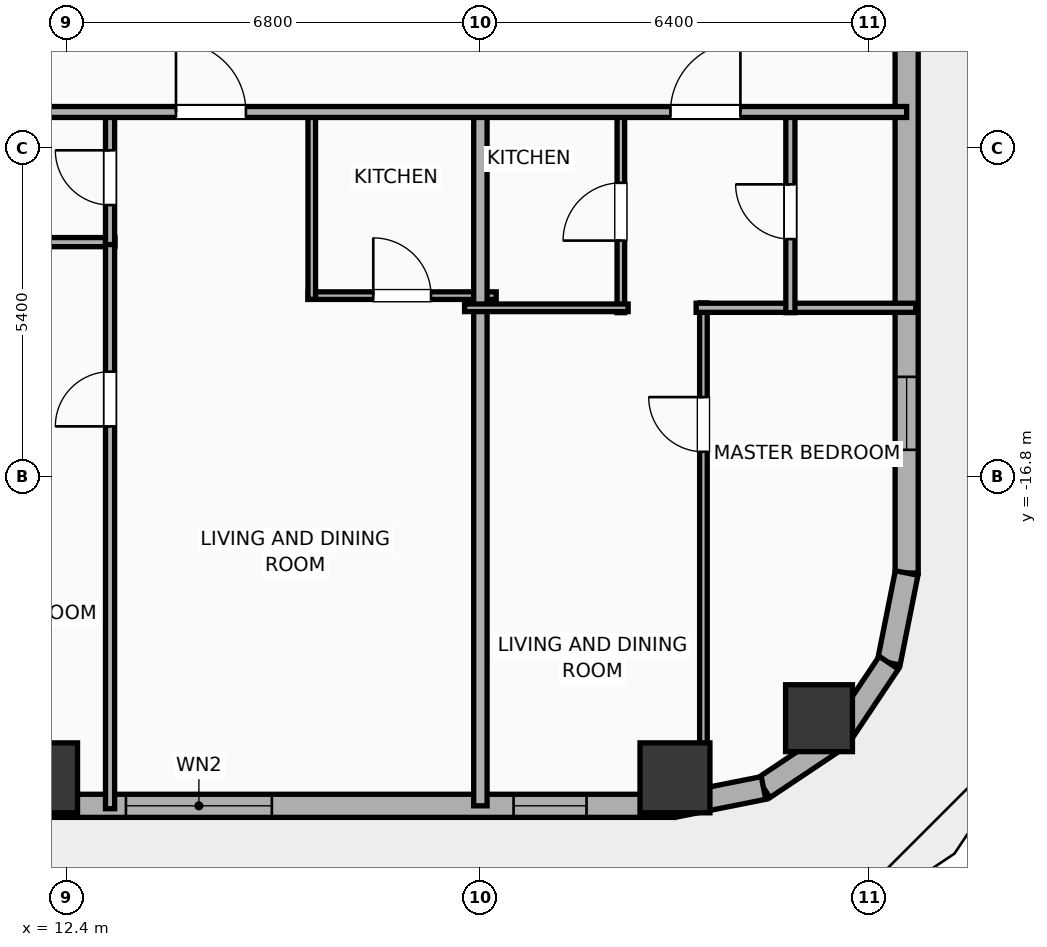
"""IFC4 building model, lengths in metres.
Left out: names, types, materials, properties, quantities, classifications, styles, units other than length and angle.
Written with IfcOpenShell. Run it as: python <this file> out.ifc"""

import sys

from ifc_helpers import new_model, si_unit, direction, frame, frame_2d, origin, origin_2d, place, context, subcontext, project, spatial, rectangle, hollow_rectangle, hollow_circle, extrude, element, fill, save


model = new_model("IFC4")
c1 = context("Model", 3, precision=1e-05, world=origin(), true_north=direction((0.0, 1.0)))
c2 = subcontext(c1, "Body", "Model", "MODEL_VIEW")
j1 = project(units=[si_unit("LENGTHUNIT", "METRE"), si_unit("PLANEANGLEUNIT", "RADIAN")], contexts=[c1])
p1 = place(None, origin())
s1 = spatial("IfcSite", under=j1, at=p1, CompositionType="ELEMENT")
p2 = place(p1, origin())
s2 = spatial("IfcBuilding", under=s1, at=p2, CompositionType="ELEMENT")
p3 = place(p2, frame((0.0, 0.0, 53.3)))
s3 = spatial("IfcBuildingStorey", under=s2, at=p3, CompositionType="ELEMENT", Elevation=53.3)
for number, where, z_axis, x_axis in (
    (1, (12.0, -21.75, 0.0), (0.0, 0.0, 1.0), (1.0, 0.0, 0.0)),
    (2, (22.4, -21.75, 0.0), (0.0, 0.0, 1.0), (1.0, 0.0, 0.0)),
):
    element("IfcColumn", number, at=place(p3, frame(where, z_axis=z_axis, x_axis=x_axis)), inside=s3, PredefinedType="COLUMN", context=c2, shape_type="SweptSolid", body=[
        extrude(hollow_rectangle(XDim=1.15, YDim=1.15, WallThickness=0.04, at=origin_2d()), origin(), (0.0, 0.0, 1.0), 3.9),
    ])
p4 = place(p3, frame((24.769, -20.769, 0.0), z_axis=(0.0, 0.0, 1.0), x_axis=(1.0, 0.0, 0.0)))
e3 = element("IfcColumn", 3, at=p4, inside=s3, PredefinedType="COLUMN", context=c2, shape_type="SweptSolid", body=[
    extrude(hollow_circle(Radius=0.55, WallThickness=0.036, at=origin_2d()), origin(), (0.0, 0.0, 1.0), 3.9),
])
p5 = place(p3, frame((22.381, -22.21, 0.0), z_axis=(0.0, 0.0, 1.0), x_axis=(-1.0, 0.0, 0.0)))
e4 = element("IfcWall", 4, at=p5, inside=s3, PredefinedType="ELEMENTEDWALL", context=c2, shape_type="SweptSolid", body=[
    extrude(rectangle(XDim=51.963, YDim=0.38, at=frame_2d((25.981, 0.0))), origin(), (0.0, 0.0, 1.0), 3.65),
])
p6 = place(p5, frame((14.839, 0.0, 0.0)))
e5 = element("IfcOpeningElement", 5, at=p6, cuts=e4, PredefinedType="OPENING", context=c2, shape_type="SweptSolid", body=[
    extrude(rectangle(XDim=1.5, YDim=2.05, at=frame_2d((0.75, 1.025))), frame((0.0, 0.2, 0.0), z_axis=(0.0, -1.0, 0.0), x_axis=(1.0, 0.0, 0.0)), (0.0, 0.0, 1.0), 0.4),
])
p7 = place(p5, frame((6.61, 0.0, 0.75)))
e6 = element("IfcOpeningElement", 6, at=p7, cuts=e4, PredefinedType="OPENING", context=c2, shape_type="SweptSolid", body=[
    extrude(rectangle(XDim=2.4, YDim=2.1, at=frame_2d((1.2, 1.05))), frame((0.0, 0.2, 0.0), z_axis=(0.0, -1.0, 0.0), x_axis=(1.0, 0.0, 0.0)), (0.0, 0.0, 1.0), 0.4),
])
p8 = place(p5, frame((24.781, 0.0, 0.75)))
e7 = element("IfcOpeningElement", 7, at=p8, cuts=e4, PredefinedType="OPENING", context=c2, shape_type="SweptSolid", body=[
    extrude(rectangle(XDim=2.4, YDim=2.1, at=frame_2d((1.2, 1.05))), frame((0.0, 0.2, 0.0), z_axis=(0.0, -1.0, 0.0), x_axis=(1.0, 0.0, 0.0)), (0.0, 0.0, 1.0), 0.4),
])
p9 = place(p5, frame((49.281, 0.0, 0.75)))
e8 = element("IfcOpeningElement", 8, at=p9, cuts=e4, PredefinedType="OPENING", context=c2, shape_type="SweptSolid", body=[
    extrude(rectangle(XDim=1.2, YDim=2.05, at=frame_2d((0.6, 1.025))), frame((0.0, 0.2, 0.0), z_axis=(0.0, -1.0, 0.0), x_axis=(1.0, 0.0, 0.0)), (0.0, 0.0, 1.0), 0.4),
])
p10 = place(p5, frame((46.241, 0.0, 0.75)))
e9 = element("IfcOpeningElement", 9, at=p10, cuts=e4, PredefinedType="OPENING", context=c2, shape_type="SweptSolid", body=[
    extrude(rectangle(XDim=1.2, YDim=2.05, at=frame_2d((0.6, 1.025))), frame((0.0, 0.2, 0.0), z_axis=(0.0, -1.0, 0.0), x_axis=(1.0, 0.0, 0.0)), (0.0, 0.0, 1.0), 0.4),
])
p11 = place(p5, frame((42.686, 0.0, 0.75)))
e10 = element("IfcOpeningElement", 10, at=p11, cuts=e4, PredefinedType="OPENING", context=c2, shape_type="SweptSolid", body=[
    extrude(rectangle(XDim=1.2, YDim=2.05, at=frame_2d((0.6, 1.025))), frame((0.0, 0.2, 0.0), z_axis=(0.0, -1.0, 0.0), x_axis=(1.0, 0.0, 0.0)), (0.0, 0.0, 1.0), 0.4),
])
p12 = place(p5, frame((39.548, 0.0, 0.75)))
e11 = element("IfcOpeningElement", 11, at=p12, cuts=e4, PredefinedType="OPENING", context=c2, shape_type="SweptSolid", body=[
    extrude(rectangle(XDim=1.2, YDim=2.05, at=frame_2d((0.6, 1.025))), frame((0.0, 0.2, 0.0), z_axis=(0.0, -1.0, 0.0), x_axis=(1.0, 0.0, 0.0)), (0.0, 0.0, 1.0), 0.4),
])
p13 = place(p5, frame((34.748, 0.0, 0.75)))
e12 = element("IfcOpeningElement", 12, at=p13, cuts=e4, PredefinedType="OPENING", context=c2, shape_type="SweptSolid", body=[
    extrude(rectangle(XDim=1.2, YDim=2.05, at=frame_2d((0.6, 1.025))), frame((0.0, 0.2, 0.0), z_axis=(0.0, -1.0, 0.0), x_axis=(1.0, 0.0, 0.0)), (0.0, 0.0, 1.0), 0.4),
])
p14 = place(p5, frame((29.226, 0.0, 0.75)))
e13 = element("IfcOpeningElement", 13, at=p14, cuts=e4, PredefinedType="OPENING", context=c2, shape_type="SweptSolid", body=[
    extrude(rectangle(XDim=1.2, YDim=2.05, at=frame_2d((0.6, 1.025))), frame((0.0, 0.2, 0.0), z_axis=(0.0, -1.0, 0.0), x_axis=(1.0, 0.0, 0.0)), (0.0, 0.0, 1.0), 0.4),
])
p15 = place(p5, frame((21.568, 0.0, 0.75)))
e14 = element("IfcOpeningElement", 14, at=p15, cuts=e4, PredefinedType="OPENING", context=c2, shape_type="SweptSolid", body=[
    extrude(rectangle(XDim=0.52, YDim=2.05, at=frame_2d((0.26, 1.025))), frame((0.0, 0.2, 0.0), z_axis=(0.0, -1.0, 0.0), x_axis=(1.0, 0.0, 0.0)), (0.0, 0.0, 1.0), 0.4),
])
p16 = place(p5, frame((11.146, 0.0, 0.75)))
e15 = element("IfcOpeningElement", 15, at=p16, cuts=e4, PredefinedType="OPENING", context=c2, shape_type="SweptSolid", body=[
    extrude(rectangle(XDim=1.2, YDim=2.05, at=frame_2d((0.6, 1.025))), frame((0.0, 0.2, 0.0), z_axis=(0.0, -1.0, 0.0), x_axis=(1.0, 0.0, 0.0)), (0.0, 0.0, 1.0), 0.4),
])
p17 = place(p5, frame((1.436, 0.0, 0.75)))
e16 = element("IfcOpeningElement", 16, at=p17, cuts=e4, PredefinedType="OPENING", context=c2, shape_type="SweptSolid", body=[
    extrude(rectangle(XDim=1.2, YDim=2.05, at=frame_2d((0.6, 1.025))), frame((0.0, 0.2, 0.0), z_axis=(0.0, -1.0, 0.0), x_axis=(1.0, 0.0, 0.0)), (0.0, 0.0, 1.0), 0.4),
])
p18 = place(p3, frame((26.21, 18.381, 0.0), z_axis=(0.0, 0.0, 1.0), x_axis=(0.0, -1.0, 0.0)))
e17 = element("IfcWall", 17, at=p18, inside=s3, PredefinedType="ELEMENTEDWALL", context=c2, shape_type="SweptSolid", body=[
    extrude(rectangle(XDim=36.763, YDim=0.38, at=frame_2d((18.381, 0.0))), origin(), (0.0, 0.0, 1.0), 3.65),
])
p19 = place(p18, frame((33.537, 0.0, 0.75)))
e18 = element("IfcOpeningElement", 18, at=p19, cuts=e17, PredefinedType="OPENING", context=c2, shape_type="SweptSolid", body=[
    extrude(rectangle(XDim=1.2, YDim=2.05, at=frame_2d((0.6, 1.025))), frame((0.0, 0.2, 0.0), z_axis=(0.0, -1.0, 0.0), x_axis=(1.0, 0.0, 0.0)), (0.0, 0.0, 1.0), 0.4),
])
p20 = place(p3, frame((26.21, -18.381, 0.0), z_axis=(0.0, 0.0, 1.0), x_axis=(-0.195086038585, -0.980786132421, 0.0)))
e19 = element("IfcWall", 19, at=p20, inside=s3, PredefinedType="ELEMENTEDWALL", context=c2, shape_type="SweptSolid", body=[
    extrude(rectangle(XDim=1.504, YDim=0.38, at=frame_2d((0.752, 0.0))), origin(), (0.0, 0.0, 1.0), 3.65),
])
for number, where, z_axis, x_axis in (
    (20, (25.917, -19.857, 0.0), (0.0, 0.0, 1.0), (-0.556, -0.831, 0.0)),
    (21, (25.091, -21.091, 0.0), (0.0, 0.0, 1.0), (-0.831, -0.556, 0.0)),
):
    element("IfcWall", number, at=place(p3, frame(where, z_axis=z_axis, x_axis=x_axis)), inside=s3, PredefinedType="ELEMENTEDWALL", context=c2, shape_type="SweptSolid", body=[
        extrude(rectangle(XDim=1.485, YDim=0.38, at=frame_2d((0.743, 0.0))), origin(), (0.0, 0.0, 1.0), 3.65),
    ])
p21 = place(p3, frame((23.857, -21.917, 0.0), z_axis=(0.0, 0.0, 1.0), x_axis=(-0.980786132421, -0.195086038585, 0.0)))
e22 = element("IfcWall", 22, at=p21, inside=s3, PredefinedType="ELEMENTEDWALL", context=c2, shape_type="SweptSolid", body=[
    extrude(rectangle(XDim=1.504, YDim=0.38, at=frame_2d((0.752, 0.0))), origin(), (0.0, 0.0, 1.0), 3.65),
])
p22 = place(p3, frame((9.34, -12.94, 0.0), z_axis=(0.0, 0.0, 1.0), x_axis=(1.0, 0.0, 0.0)))
e23 = element("IfcWall", 23, at=p22, inside=s3, PredefinedType="PLUMBINGWALL", context=c2, shape_type="SweptSolid", body=[
    extrude(rectangle(XDim=3.85, YDim=0.15, at=frame_2d((1.925, 0.0))), origin(), (0.0, 0.0, 1.0), 3.65),
])
p23 = place(p3, frame((13.11, -22.258, 0.0), z_axis=(0.0, 0.0, 1.0), x_axis=(0.0, 1.0, 0.0)))
e24 = element("IfcWall", 24, at=p23, inside=s3, PredefinedType="PLUMBINGWALL", context=c2, shape_type="SweptSolid", body=[
    extrude(rectangle(XDim=9.358, YDim=0.15, at=frame_2d((4.679, 0.0))), origin(), (0.0, 0.0, 1.0), 3.65),
])
p24 = place(p23, frame((6.288, 0.0, 0.0)))
e25 = element("IfcOpeningElement", 25, at=p24, cuts=e24, PredefinedType="OPENING", context=c2, shape_type="SweptSolid", body=[
    extrude(rectangle(XDim=0.9, YDim=2.05, at=frame_2d((0.45, 1.025))), frame((0.0, 0.085, 0.0), z_axis=(0.0, -1.0, 0.0), x_axis=(1.0, 0.0, 0.0)), (0.0, 0.0, 1.0), 0.17),
])
p25 = place(p3, frame((13.11, -12.98, 0.0), z_axis=(0.0, 0.0, 1.0), x_axis=(0.0, 1.0, 0.0)))
e26 = element("IfcWall", 26, at=p25, inside=s3, PredefinedType="PLUMBINGWALL", context=c2, shape_type="SweptSolid", body=[
    extrude(rectangle(XDim=2.2, YDim=0.15, at=frame_2d((1.1, 0.0))), origin(), (0.0, 0.0, 1.0), 3.65),
])
p26 = place(p25, frame((0.65, 0.0, 0.0)))
e27 = element("IfcOpeningElement", 27, at=p26, cuts=e26, PredefinedType="OPENING", context=c2, shape_type="SweptSolid", body=[
    extrude(rectangle(XDim=0.9, YDim=2.05, at=frame_2d((0.45, 1.025))), frame((0.0, 0.085, 0.0), z_axis=(0.0, -1.0, 0.0), x_axis=(1.0, 0.0, 0.0)), (0.0, 0.0, 1.0), 0.17),
])
p27 = place(p3, frame((16.367, -13.82, 0.0), z_axis=(0.0, 0.0, 1.0), x_axis=(1.0, 0.0, 0.0)))
e28 = element("IfcWall", 28, at=p27, inside=s3, PredefinedType="PARTITIONING", context=c2, shape_type="SweptSolid", body=[
    extrude(rectangle(XDim=3.093, YDim=0.125, at=frame_2d((1.546, 0.0))), origin(), (0.0, 0.0, 1.0), 3.65),
])
p28 = place(p27, frame((1.072, 0.0, 0.0)))
e29 = element("IfcOpeningElement", 29, at=p28, cuts=e28, PredefinedType="OPENING", context=c2, shape_type="SweptSolid", body=[
    extrude(rectangle(XDim=0.95, YDim=2.05, at=frame_2d((0.475, 1.025))), frame((0.0, 0.073, 0.0), z_axis=(0.0, -1.0, 0.0), x_axis=(1.0, 0.0, 0.0)), (0.0, 0.0, 1.0), 0.145),
])
p29 = place(p3, frame((16.427, -13.88, 0.0), z_axis=(0.0, 0.0, 1.0), x_axis=(0.0, 1.0, 0.0)))
e30 = element("IfcWall", 30, at=p29, inside=s3, PredefinedType="PARTITIONING", context=c2, shape_type="SweptSolid", body=[
    extrude(rectangle(XDim=3.1, YDim=0.125, at=frame_2d((1.55, 0.0))), origin(), (0.0, 0.0, 1.0), 3.65),
])
p30 = place(p3, frame((19.2, -22.21, 0.0), z_axis=(0.0, 0.0, 1.0), x_axis=(0.0, 1.0, 0.0)))
e31 = element("IfcWall", 31, at=p30, inside=s3, PredefinedType="PARTITIONING", context=c2, shape_type="SweptSolid", body=[
    extrude(rectangle(XDim=11.49, YDim=0.22, at=frame_2d((5.745, 0.0))), origin(), (0.0, 0.0, 1.0), 3.65),
])
p31 = place(p3, frame((22.868, -22.266, 0.0), z_axis=(0.0, 0.0, 1.0), x_axis=(0.0, 1.0, 0.0)))
e32 = element("IfcWall", 32, at=p31, inside=s3, PredefinedType="PARTITIONING", context=c2, shape_type="SweptSolid", body=[
    extrude(rectangle(XDim=8.326, YDim=0.125, at=frame_2d((4.163, 0.0))), origin(), (0.0, 0.0, 1.0), 3.65),
])
p32 = place(p31, frame((5.878, 0.0, 0.0)))
e33 = element("IfcOpeningElement", 33, at=p32, cuts=e32, PredefinedType="OPENING", context=c2, shape_type="SweptSolid", body=[
    extrude(rectangle(XDim=0.9, YDim=2.05, at=frame_2d((0.45, 1.025))), frame((0.0, 0.073, 0.0), z_axis=(0.0, -1.0, 0.0), x_axis=(1.0, 0.0, 0.0)), (0.0, 0.0, 1.0), 0.145),
])
p33 = place(p3, frame((22.748, -14.02, 0.0), z_axis=(0.0, 0.0, 1.0), x_axis=(1.0, 0.0, 0.0)))
e34 = element("IfcWall", 34, at=p33, inside=s3, PredefinedType="PLUMBINGWALL", context=c2, shape_type="SweptSolid", body=[
    extrude(rectangle(XDim=3.612, YDim=0.15, at=frame_2d((1.806, 0.0))), origin(), (0.0, 0.0, 1.0), 3.65),
])
p34 = place(p3, frame((21.51, -14.1, 0.0), z_axis=(0.0, 0.0, 1.0), x_axis=(0.0, 1.0, 0.0)))
e35 = element("IfcWall", 35, at=p34, inside=s3, PredefinedType="PARTITIONING", context=c2, shape_type="SweptSolid", body=[
    extrude(rectangle(XDim=3.32, YDim=0.125, at=frame_2d((1.66, 0.0))), origin(), (0.0, 0.0, 1.0), 3.65),
])
p35 = place(p34, frame((1.185, 0.0, 0.0)))
e36 = element("IfcOpeningElement", 36, at=p35, cuts=e35, PredefinedType="OPENING", context=c2, shape_type="SweptSolid", body=[
    extrude(rectangle(XDim=0.95, YDim=2.05, at=frame_2d((0.475, 1.025))), frame((0.0, 0.073, 0.0), z_axis=(0.0, -1.0, 0.0), x_axis=(1.0, 0.0, 0.0)), (0.0, 0.0, 1.0), 0.145),
])
p36 = place(p3, frame((18.94, -14.02, 0.0), z_axis=(0.0, 0.0, 1.0), x_axis=(1.0, 0.0, 0.0)))
e37 = element("IfcWall", 37, at=p36, inside=s3, PredefinedType="PARTITIONING", context=c2, shape_type="SweptSolid", body=[
    extrude(rectangle(XDim=2.69, YDim=0.125, at=frame_2d((1.345, 0.0))), origin(), (0.0, 0.0, 1.0), 3.65),
])
p37 = place(p3, frame((24.298, -14.1, 0.0), z_axis=(0.0, 0.0, 1.0), x_axis=(0.0, 1.0, 0.0)))
e38 = element("IfcWall", 38, at=p37, inside=s3, PredefinedType="PLUMBINGWALL", context=c2, shape_type="SweptSolid", body=[
    extrude(rectangle(XDim=3.32, YDim=0.15, at=frame_2d((1.66, 0.0))), origin(), (0.0, 0.0, 1.0), 3.65),
])
p38 = place(p37, frame((1.21, 0.0, 0.0)))
e39 = element("IfcOpeningElement", 39, at=p38, cuts=e38, PredefinedType="OPENING", context=c2, shape_type="SweptSolid", body=[
    extrude(rectangle(XDim=0.9, YDim=2.05, at=frame_2d((0.45, 1.025))), frame((0.0, 0.085, 0.0), z_axis=(0.0, -1.0, 0.0), x_axis=(1.0, 0.0, 0.0)), (0.0, 0.0, 1.0), 0.17),
])
p39 = place(p3, frame((-33.41, -10.8, 0.0), z_axis=(0.0, 0.0, 1.0), x_axis=(1.0, 0.0, 0.0)))
e40 = element("IfcWall", 40, at=p39, inside=s3, PredefinedType="PARTITIONING", context=c2, shape_type="SweptSolid", body=[
    extrude(rectangle(XDim=59.62, YDim=0.18, at=frame_2d((29.81, 0.0))), origin(), (0.0, 0.0, 1.0), 3.65),
])
p40 = place(p39, frame((3.104, 0.0, 0.0)))
e41 = element("IfcOpeningElement", 41, at=p40, cuts=e40, PredefinedType="OPENING", context=c2, shape_type="SweptSolid", body=[
    extrude(rectangle(XDim=1.15, YDim=2.05, at=frame_2d((0.575, 1.025))), frame((0.0, 0.1, 0.0), z_axis=(0.0, -1.0, 0.0), x_axis=(1.0, 0.0, 0.0)), (0.0, 0.0, 1.0), 0.2),
])
p41 = place(p39, frame((10.246, 0.0, 0.0)))
e42 = element("IfcOpeningElement", 42, at=p41, cuts=e40, PredefinedType="OPENING", context=c2, shape_type="SweptSolid", body=[
    extrude(rectangle(XDim=1.15, YDim=2.05, at=frame_2d((0.575, 1.025))), frame((0.0, 0.1, 0.0), z_axis=(0.0, -1.0, 0.0), x_axis=(1.0, 0.0, 0.0)), (0.0, 0.0, 1.0), 0.2),
])
p42 = place(p39, frame((18.336, 0.0, 0.0)))
e43 = element("IfcOpeningElement", 43, at=p42, cuts=e40, PredefinedType="OPENING", context=c2, shape_type="SweptSolid", body=[
    extrude(rectangle(XDim=1.15, YDim=2.05, at=frame_2d((0.575, 1.025))), frame((0.0, 0.1, 0.0), z_axis=(0.0, -1.0, 0.0), x_axis=(1.0, 0.0, 0.0)), (0.0, 0.0, 1.0), 0.2),
])
p43 = place(p39, frame((28.287, 0.0, 0.0)))
e44 = element("IfcOpeningElement", 44, at=p43, cuts=e40, PredefinedType="OPENING", context=c2, shape_type="SweptSolid", body=[
    extrude(rectangle(XDim=1.15, YDim=2.05, at=frame_2d((0.575, 1.025))), frame((0.0, 0.1, 0.0), z_axis=(0.0, -1.0, 0.0), x_axis=(1.0, 0.0, 0.0)), (0.0, 0.0, 1.0), 0.2),
])
p44 = place(p39, frame((37.653, 0.0, 0.0)))
e45 = element("IfcOpeningElement", 45, at=p44, cuts=e40, PredefinedType="OPENING", context=c2, shape_type="SweptSolid", body=[
    extrude(rectangle(XDim=1.15, YDim=2.05, at=frame_2d((0.575, 1.025))), frame((0.0, 0.1, 0.0), z_axis=(0.0, -1.0, 0.0), x_axis=(1.0, 0.0, 0.0)), (0.0, 0.0, 1.0), 0.2),
])
p45 = place(p39, frame((47.604, 0.0, 0.0)))
e46 = element("IfcOpeningElement", 46, at=p45, cuts=e40, PredefinedType="OPENING", context=c2, shape_type="SweptSolid", body=[
    extrude(rectangle(XDim=1.15, YDim=2.05, at=frame_2d((0.575, 1.025))), frame((0.0, 0.1, 0.0), z_axis=(0.0, -1.0, 0.0), x_axis=(1.0, 0.0, 0.0)), (0.0, 0.0, 1.0), 0.2),
])
p46 = place(p39, frame((55.736, 0.0, 0.0)))
e47 = element("IfcOpeningElement", 47, at=p46, cuts=e40, PredefinedType="OPENING", context=c2, shape_type="SweptSolid", body=[
    extrude(rectangle(XDim=1.15, YDim=2.05, at=frame_2d((0.575, 1.025))), frame((0.0, 0.1, 0.0), z_axis=(0.0, -1.0, 0.0), x_axis=(1.0, 0.0, 0.0)), (0.0, 0.0, 1.0), 0.2),
])
p47 = place(p7, origin())
e48 = element("IfcWindow", 48, at=p47, inside=s3, PartitioningType="SINGLE_PANEL", PredefinedType="WINDOW", context=c2, shape_type="SweptSolid", body=[
    extrude(rectangle(XDim=2.4, YDim=2.1, at=frame_2d((1.2, 1.05))), frame((0.0, 0.03, 0.0), z_axis=(0.0, -1.0, 0.0), x_axis=(1.0, 0.0, 0.0)), (0.0, 0.0, 1.0), 0.06),
])
fill(e6, e48)
p48 = place(p17, origin())
e49 = element("IfcWindow", 49, at=p48, inside=s3, PartitioningType="SINGLE_PANEL", PredefinedType="WINDOW", context=c2, shape_type="SweptSolid", body=[
    extrude(rectangle(XDim=1.2, YDim=2.05, at=frame_2d((0.6, 1.025))), frame((0.0, 0.03, 0.0), z_axis=(0.0, -1.0, 0.0), x_axis=(1.0, 0.0, 0.0)), (0.0, 0.0, 1.0), 0.06),
])
fill(e16, e49)
p49 = place(p19, origin())
e50 = element("IfcWindow", 50, at=p49, inside=s3, PartitioningType="SINGLE_PANEL", PredefinedType="WINDOW", context=c2, shape_type="SweptSolid", body=[
    extrude(rectangle(XDim=1.2, YDim=2.05, at=frame_2d((0.6, 1.025))), frame((0.0, 0.03, 0.0), z_axis=(0.0, -1.0, 0.0), x_axis=(1.0, 0.0, 0.0)), (0.0, 0.0, 1.0), 0.06),
])
fill(e18, e50)
p50 = place(p24, origin())
e51 = element("IfcDoor", 51, at=p50, inside=s3, OperationType="SINGLE_SWING_LEFT", PredefinedType="DOOR", context=c2, shape_type="SweptSolid", body=[
    extrude(rectangle(XDim=0.9, YDim=2.05, at=frame_2d((0.45, 1.025))), frame((0.0, 0.025, 0.0), z_axis=(0.0, -1.0, 0.0), x_axis=(1.0, 0.0, 0.0)), (0.0, 0.0, 1.0), 0.05),
])
fill(e25, e51)
p51 = place(p26, origin())
e52 = element("IfcDoor", 52, at=p51, inside=s3, OperationType="SINGLE_SWING_RIGHT", PredefinedType="DOOR", context=c2, shape_type="SweptSolid", body=[
    extrude(rectangle(XDim=0.9, YDim=2.05, at=frame_2d((0.45, 1.025))), frame((0.0, 0.025, 0.0), z_axis=(0.0, -1.0, 0.0), x_axis=(1.0, 0.0, 0.0)), (0.0, 0.0, 1.0), 0.05),
])
fill(e27, e52)
p52 = place(p28, origin())
e53 = element("IfcDoor", 53, at=p52, inside=s3, OperationType="SINGLE_SWING_LEFT", PredefinedType="DOOR", context=c2, shape_type="SweptSolid", body=[
    extrude(rectangle(XDim=0.95, YDim=2.05, at=frame_2d((0.475, 1.025))), frame((0.0, 0.025, 0.0), z_axis=(0.0, -1.0, 0.0), x_axis=(1.0, 0.0, 0.0)), (0.0, 0.0, 1.0), 0.05),
])
fill(e29, e53)
p53 = place(p32, origin())
e54 = element("IfcDoor", 54, at=p53, inside=s3, OperationType="SINGLE_SWING_RIGHT", PredefinedType="DOOR", context=c2, shape_type="SweptSolid", body=[
    extrude(rectangle(XDim=0.9, YDim=2.05, at=frame_2d((0.45, 1.025))), frame((0.0, 0.025, 0.0), z_axis=(0.0, -1.0, 0.0), x_axis=(1.0, 0.0, 0.0)), (0.0, 0.0, 1.0), 0.05),
])
fill(e33, e54)
p54 = place(p35, origin())
e55 = element("IfcDoor", 55, at=p54, inside=s3, OperationType="SINGLE_SWING_LEFT", PredefinedType="DOOR", context=c2, shape_type="SweptSolid", body=[
    extrude(rectangle(XDim=0.95, YDim=2.05, at=frame_2d((0.475, 1.025))), frame((0.0, 0.025, 0.0), z_axis=(0.0, -1.0, 0.0), x_axis=(1.0, 0.0, 0.0)), (0.0, 0.0, 1.0), 0.05),
])
fill(e36, e55)
p55 = place(p38, origin())
e56 = element("IfcDoor", 56, at=p55, inside=s3, OperationType="SINGLE_SWING_RIGHT", PredefinedType="DOOR", context=c2, shape_type="SweptSolid", body=[
    extrude(rectangle(XDim=0.9, YDim=2.05, at=frame_2d((0.45, 1.025))), frame((0.0, 0.025, 0.0), z_axis=(0.0, -1.0, 0.0), x_axis=(1.0, 0.0, 0.0)), (0.0, 0.0, 1.0), 0.05),
])
fill(e39, e56)
p56 = place(p45, origin())
e57 = element("IfcDoor", 57, at=p56, inside=s3, OperationType="SINGLE_SWING_LEFT", PredefinedType="DOOR", context=c2, shape_type="SweptSolid", body=[
    extrude(rectangle(XDim=1.15, YDim=2.05, at=frame_2d((0.575, 1.025))), frame((0.0, 0.025, 0.0), z_axis=(0.0, -1.0, 0.0), x_axis=(1.0, 0.0, 0.0)), (0.0, 0.0, 1.0), 0.05),
])
fill(e46, e57)
p57 = place(p46, origin())
e58 = element("IfcDoor", 58, at=p57, inside=s3, OperationType="SINGLE_SWING_RIGHT", PredefinedType="DOOR", context=c2, shape_type="SweptSolid", body=[
    extrude(rectangle(XDim=1.15, YDim=2.05, at=frame_2d((0.575, 1.025))), frame((0.0, 0.025, 0.0), z_axis=(0.0, -1.0, 0.0), x_axis=(1.0, 0.0, 0.0)), (0.0, 0.0, 1.0), 0.05),
])
fill(e47, e58)
save(model, sys.argv[1])
